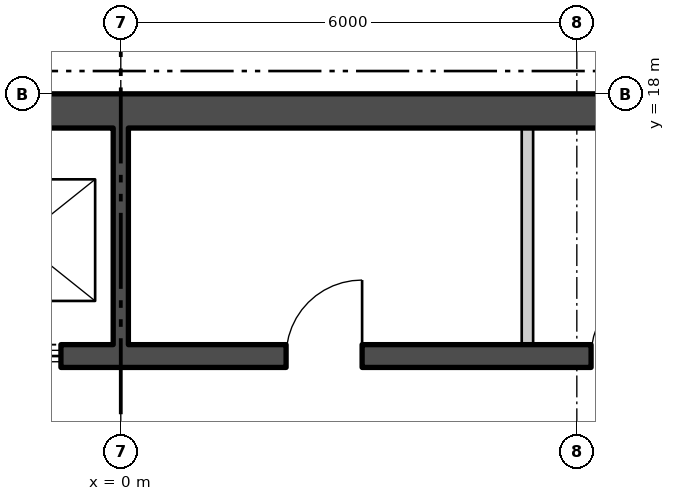
"""IFC4 building model, lengths in metres.
Left out: names, types, materials, properties, quantities, classifications, styles, units other than length and angle.
Written with IfcOpenShell. Run it as: python <this file> out.ifc"""

import sys

from ifc_helpers import new_model, si_unit, direction, frame, frame_2d, origin, place, context, subcontext, project, spatial, polyline, rectangle, outline, extrude, element, fill, save


model = new_model("IFC4")
c1 = context("Model", 3, precision=1e-05, world=origin(), true_north=direction((0.0, 1.0)))
c2 = subcontext(c1, "Body", "Model", "MODEL_VIEW")
j1 = project(units=[si_unit("LENGTHUNIT", "METRE"), si_unit("PLANEANGLEUNIT", "RADIAN")], contexts=[c1])
p1 = place(None, origin())
s1 = spatial("IfcSite", under=j1, at=p1, CompositionType="ELEMENT")
p2 = place(p1, origin())
s2 = spatial("IfcBuilding", under=s1, at=p2, CompositionType="ELEMENT")
p3 = place(p2, frame((0.0, 0.0, 216.0)))
s3 = spatial("IfcBuildingStorey", under=s2, at=p3, CompositionType="ELEMENT", Elevation=216.0)
p4 = place(p3, frame((3.36, -25.466, -0.18), z_axis=(0.0, 0.0, 1.0), x_axis=(0.500000335318, 0.866025210188, 0.0)))
e1 = element("IfcWall", 1, at=p4, inside=s3, PredefinedType="SOLIDWALL", context=c2, shape_type="SweptSolid", body=[
    extrude(outline(polyline([(-0.13, -0.225), (45.88, -0.225), (45.62, 0.225), (0.13, 0.225), (-0.13, -0.225)])), origin(), (0.0, 0.0, 1.0), 3.68),
])
p5 = place(p4, frame((1.425, 0.0, 1.08)))
e2 = element("IfcOpeningElement", 2, at=p5, cuts=e1, PredefinedType="OPENING", context=c2, shape_type="SweptSolid", body=[
    extrude(rectangle(XDim=2.4, YDim=2.0, at=frame_2d((1.2, 1.0))), frame((0.0, 0.235, 0.0), z_axis=(0.0, -1.0, 0.0), x_axis=(1.0, 0.0, 0.0)), (0.0, 0.0, 1.0), 0.47),
])
p6 = place(p4, frame((5.895, 0.0, 1.08)))
e3 = element("IfcOpeningElement", 3, at=p6, cuts=e1, PredefinedType="OPENING", context=c2, shape_type="SweptSolid", body=[
    extrude(rectangle(XDim=2.4, YDim=2.0, at=frame_2d((1.2, 1.0))), frame((0.0, 0.235, 0.0), z_axis=(0.0, -1.0, 0.0), x_axis=(1.0, 0.0, 0.0)), (0.0, 0.0, 1.0), 0.47),
])
p7 = place(p4, frame((10.403, 0.0, 1.08)))
e4 = element("IfcOpeningElement", 4, at=p7, cuts=e1, PredefinedType="OPENING", context=c2, shape_type="SweptSolid", body=[
    extrude(rectangle(XDim=2.4, YDim=2.0, at=frame_2d((1.2, 1.0))), frame((0.0, 0.235, 0.0), z_axis=(0.0, -1.0, 0.0), x_axis=(1.0, 0.0, 0.0)), (0.0, 0.0, 1.0), 0.47),
])
p8 = place(p4, frame((14.912, 0.0, 1.08)))
e5 = element("IfcOpeningElement", 5, at=p8, cuts=e1, PredefinedType="OPENING", context=c2, shape_type="SweptSolid", body=[
    extrude(rectangle(XDim=2.4, YDim=2.0, at=frame_2d((1.2, 1.0))), frame((0.0, 0.235, 0.0), z_axis=(0.0, -1.0, 0.0), x_axis=(1.0, 0.0, 0.0)), (0.0, 0.0, 1.0), 0.47),
])
p9 = place(p4, frame((19.421, 0.0, 1.08)))
e6 = element("IfcOpeningElement", 6, at=p9, cuts=e1, PredefinedType="OPENING", context=c2, shape_type="SweptSolid", body=[
    extrude(rectangle(XDim=2.4, YDim=2.0, at=frame_2d((1.2, 1.0))), frame((0.0, 0.235, 0.0), z_axis=(0.0, -1.0, 0.0), x_axis=(1.0, 0.0, 0.0)), (0.0, 0.0, 1.0), 0.47),
])
p10 = place(p4, frame((23.929, 0.0, 1.08)))
e7 = element("IfcOpeningElement", 7, at=p10, cuts=e1, PredefinedType="OPENING", context=c2, shape_type="SweptSolid", body=[
    extrude(rectangle(XDim=2.4, YDim=2.0, at=frame_2d((1.2, 1.0))), frame((0.0, 0.235, 0.0), z_axis=(0.0, -1.0, 0.0), x_axis=(1.0, 0.0, 0.0)), (0.0, 0.0, 1.0), 0.47),
])
p11 = place(p4, frame((32.947, 0.0, 1.08)))
e8 = element("IfcOpeningElement", 8, at=p11, cuts=e1, PredefinedType="OPENING", context=c2, shape_type="SweptSolid", body=[
    extrude(rectangle(XDim=2.4, YDim=2.0, at=frame_2d((1.2, 1.0))), frame((0.0, 0.235, 0.0), z_axis=(0.0, -1.0, 0.0), x_axis=(1.0, 0.0, 0.0)), (0.0, 0.0, 1.0), 0.47),
])
p12 = place(p4, frame((37.455, 0.0, 1.08)))
e9 = element("IfcOpeningElement", 9, at=p12, cuts=e1, PredefinedType="OPENING", context=c2, shape_type="SweptSolid", body=[
    extrude(rectangle(XDim=2.4, YDim=2.0, at=frame_2d((1.2, 1.0))), frame((0.0, 0.235, 0.0), z_axis=(0.0, -1.0, 0.0), x_axis=(1.0, 0.0, 0.0)), (0.0, 0.0, 1.0), 0.47),
])
p13 = place(p4, frame((41.925, 0.0, 1.08)))
e10 = element("IfcOpeningElement", 10, at=p13, cuts=e1, PredefinedType="OPENING", context=c2, shape_type="SweptSolid", body=[
    extrude(rectangle(XDim=2.4, YDim=2.0, at=frame_2d((1.2, 1.0))), frame((0.0, 0.235, 0.0), z_axis=(0.0, -1.0, 0.0), x_axis=(1.0, 0.0, 0.0)), (0.0, 0.0, 1.0), 0.47),
])
p14 = place(p3, frame((-16.2, 17.775, 0.0), z_axis=(0.0, 0.0, 1.0), x_axis=(1.0, 0.0, 0.0)))
e11 = element("IfcWall", 11, at=p14, inside=s3, PredefinedType="SHEAR", context=c2, shape_type="SweptSolid", body=[
    extrude(rectangle(XDim=32.4, YDim=0.45, at=frame_2d((16.2, 0.0))), origin(), (0.0, 0.0, 1.0), 3.7),
])
p15 = place(p3, frame((-10.7, 14.55, 0.0), z_axis=(0.0, 0.0, 1.0), x_axis=(1.0, 0.0, 0.0)))
e12 = element("IfcWall", 12, at=p15, inside=s3, PredefinedType="SHEAR", context=c2, shape_type="SweptSolid", body=[
    extrude(rectangle(XDim=21.4, YDim=0.3, at=frame_2d((10.7, 0.0))), origin(), (0.0, 0.0, 1.0), 3.7),
])
p16 = place(p15, frame((0.738, 0.0, 0.0)))
e13 = element("IfcOpeningElement", 13, at=p16, cuts=e12, PredefinedType="OPENING", context=c2, shape_type="SweptSolid", body=[
    extrude(rectangle(XDim=1.1, YDim=2.1, at=frame_2d((0.55, 1.05))), frame((0.0, 0.16, 0.0), z_axis=(0.0, -1.0, 0.0), x_axis=(1.0, 0.0, 0.0)), (0.0, 0.0, 1.0), 0.32),
])
p17 = place(p15, frame((3.462, 0.0, 0.0)))
e14 = element("IfcOpeningElement", 14, at=p17, cuts=e12, PredefinedType="OPENING", context=c2, shape_type="SweptSolid", body=[
    extrude(rectangle(XDim=1.1, YDim=2.1, at=frame_2d((0.55, 1.05))), frame((0.0, 0.16, 0.0), z_axis=(0.0, -1.0, 0.0), x_axis=(1.0, 0.0, 0.0)), (0.0, 0.0, 1.0), 0.32),
])
p18 = place(p15, frame((6.138, 0.0, 0.0)))
e15 = element("IfcOpeningElement", 15, at=p18, cuts=e12, PredefinedType="OPENING", context=c2, shape_type="SweptSolid", body=[
    extrude(rectangle(XDim=1.1, YDim=2.1, at=frame_2d((0.55, 1.05))), frame((0.0, 0.16, 0.0), z_axis=(0.0, -1.0, 0.0), x_axis=(1.0, 0.0, 0.0)), (0.0, 0.0, 1.0), 0.32),
])
p19 = place(p15, frame((8.812, 0.0, 0.0)))
e16 = element("IfcOpeningElement", 16, at=p19, cuts=e12, PredefinedType="OPENING", context=c2, shape_type="SweptSolid", body=[
    extrude(rectangle(XDim=1.1, YDim=2.1, at=frame_2d((0.55, 1.05))), frame((0.0, 0.16, 0.0), z_axis=(0.0, -1.0, 0.0), x_axis=(1.0, 0.0, 0.0)), (0.0, 0.0, 1.0), 0.32),
])
p20 = place(p15, frame((19.562, 0.0, 0.0)))
e17 = element("IfcOpeningElement", 17, at=p20, cuts=e12, PredefinedType="OPENING", context=c2, shape_type="SweptSolid", body=[
    extrude(rectangle(XDim=1.1, YDim=2.1, at=frame_2d((0.55, 1.05))), frame((0.0, 0.16, 0.0), z_axis=(0.0, -1.0, 0.0), x_axis=(1.0, 0.0, 0.0)), (0.0, 0.0, 1.0), 0.32),
])
p21 = place(p15, frame((12.875, 0.0, 0.0)))
e18 = element("IfcOpeningElement", 18, at=p21, cuts=e12, PredefinedType="OPENING", context=c2, shape_type="SweptSolid", body=[
    extrude(rectangle(XDim=1.0, YDim=2.1, at=frame_2d((0.5, 1.05))), frame((0.0, 0.16, 0.0), z_axis=(0.0, -1.0, 0.0), x_axis=(1.0, 0.0, 0.0)), (0.0, 0.0, 1.0), 0.32),
])
p22 = place(p15, frame((16.887, 0.0, 0.0)))
e19 = element("IfcOpeningElement", 19, at=p22, cuts=e12, PredefinedType="OPENING", context=c2, shape_type="SweptSolid", body=[
    extrude(rectangle(XDim=1.0, YDim=2.1, at=frame_2d((0.5, 1.05))), frame((0.0, 0.16, 0.0), z_axis=(0.0, -1.0, 0.0), x_axis=(1.0, 0.0, 0.0)), (0.0, 0.0, 1.0), 0.32),
])
p23 = place(p3, frame((0.0, 14.7, 0.0), z_axis=(0.0, 0.0, 1.0), x_axis=(0.0, 1.0, 0.0)))
e20 = element("IfcWall", 20, at=p23, inside=s3, PredefinedType="SHEAR", context=c2, shape_type="SweptSolid", body=[
    extrude(rectangle(XDim=2.85, YDim=0.2, at=frame_2d((1.425, 0.0))), origin(), (0.0, 0.0, 1.0), 3.7),
])
p24 = place(p3, frame((5.35, 14.7, 0.0), z_axis=(0.0, 0.0, 1.0), x_axis=(0.0, 1.0, 0.0)))
e21 = element("IfcWall", 21, at=p24, inside=s3, PredefinedType="PARTITIONING", context=c2, shape_type="SweptSolid", body=[
    extrude(rectangle(XDim=2.85, YDim=0.15, at=frame_2d((1.425, 0.0))), origin(), (0.0, 0.0, 1.0), 3.7),
])
p25 = place(p19, origin())
e22 = element("IfcDoor", 22, at=p25, inside=s3, OperationType="SLIDING_TO_LEFT", PredefinedType="DOOR", context=c2, shape_type="SweptSolid", body=[
    extrude(rectangle(XDim=1.1, YDim=2.1, at=frame_2d((0.55, 1.05))), frame((0.0, 0.025, 0.0), z_axis=(0.0, -1.0, 0.0), x_axis=(1.0, 0.0, 0.0)), (0.0, 0.0, 1.0), 0.05),
])
fill(e16, e22)
p26 = place(p21, origin())
e23 = element("IfcDoor", 23, at=p26, inside=s3, OperationType="SINGLE_SWING_LEFT", PredefinedType="DOOR", context=c2, shape_type="SweptSolid", body=[
    extrude(rectangle(XDim=1.0, YDim=2.1, at=frame_2d((0.5, 1.05))), frame((0.0, 0.025, 0.0), z_axis=(0.0, -1.0, 0.0), x_axis=(1.0, 0.0, 0.0)), (0.0, 0.0, 1.0), 0.05),
])
fill(e18, e23)
p27 = place(p22, origin())
e24 = element("IfcDoor", 24, at=p27, inside=s3, OperationType="SINGLE_SWING_LEFT", PredefinedType="DOOR", context=c2, shape_type="SweptSolid", body=[
    extrude(rectangle(XDim=1.0, YDim=2.1, at=frame_2d((0.5, 1.05))), frame((0.0, 0.025, 0.0), z_axis=(0.0, -1.0, 0.0), x_axis=(1.0, 0.0, 0.0)), (0.0, 0.0, 1.0), 0.05),
])
fill(e19, e24)
save(model, sys.argv[1])
